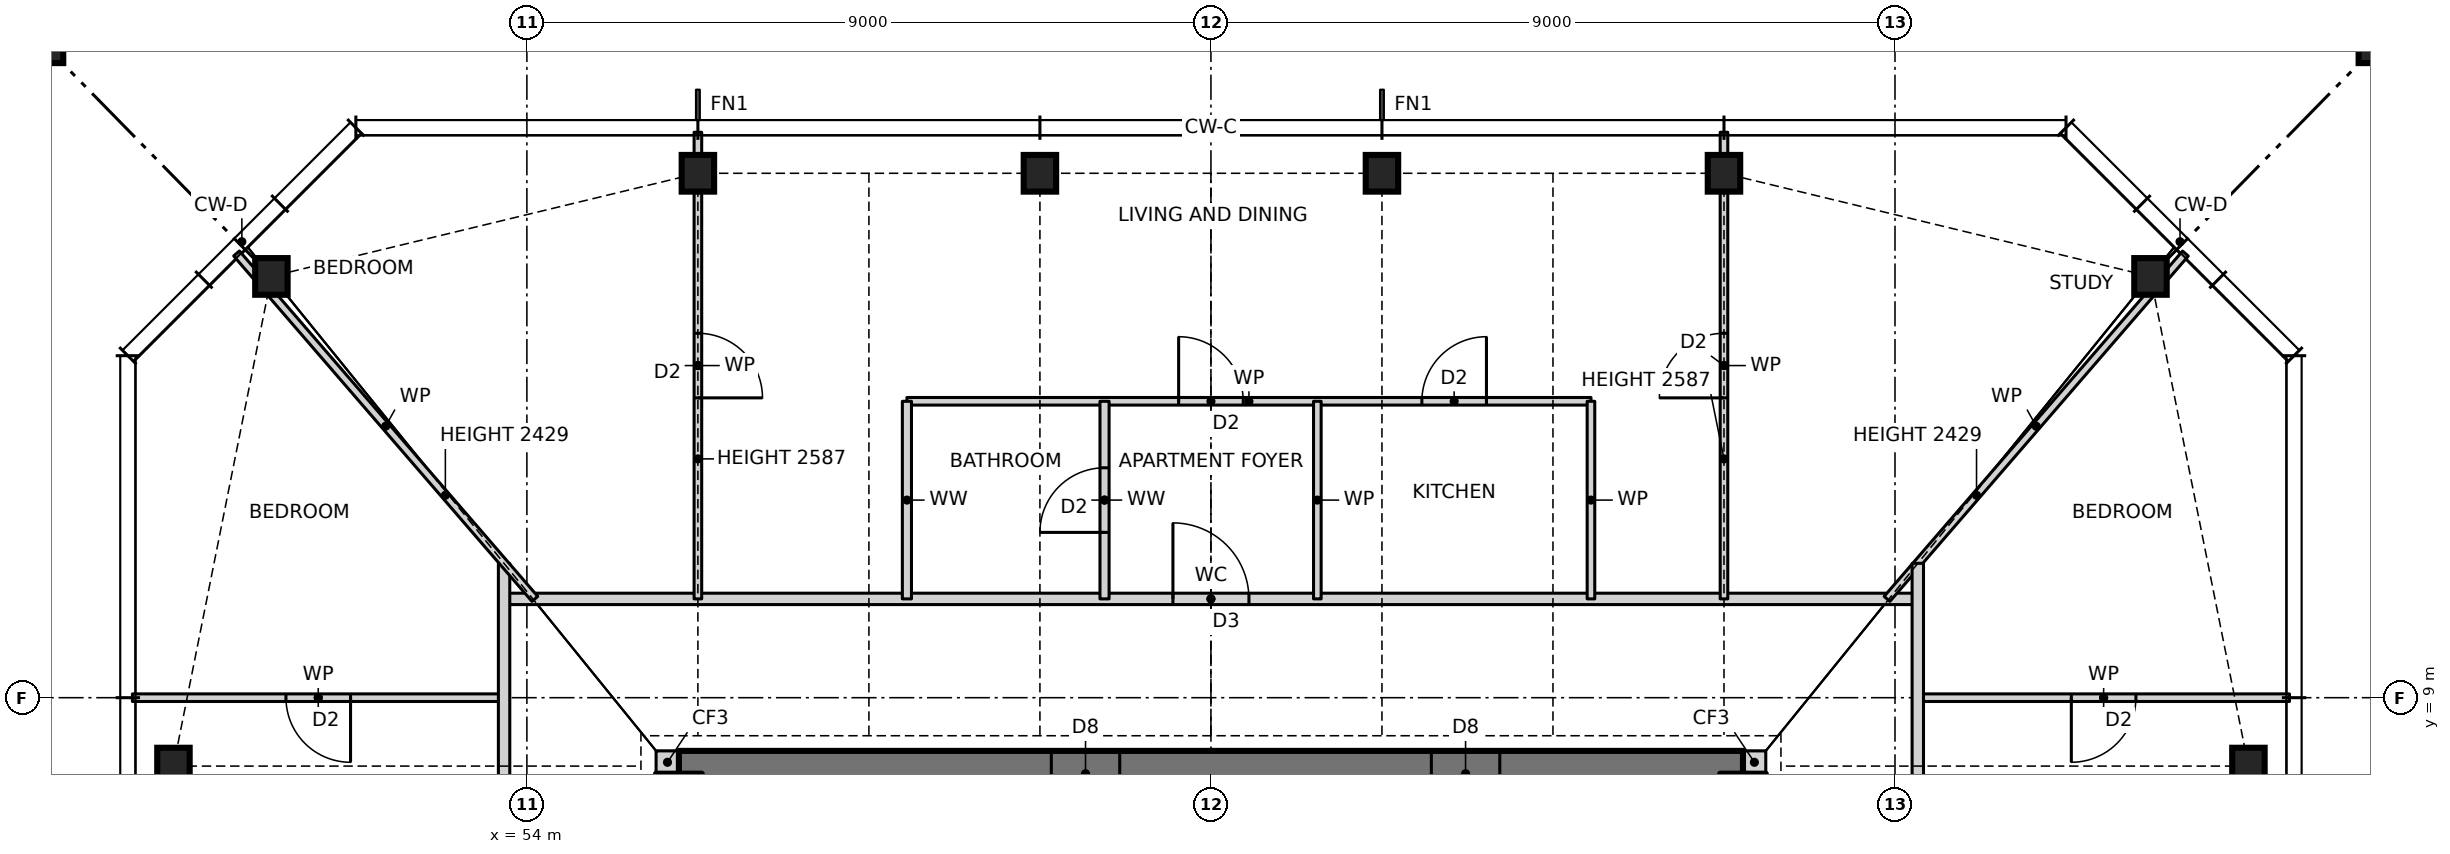
"""IFC4 building model, lengths in metres.
Left out: names, types, materials, properties, quantities, classifications, styles, units other than length and angle.
Written with IfcOpenShell. Run it as: python <this file> out.ifc"""

import sys

from ifc_helpers import new_model, si_unit, direction, frame, frame_2d, origin, origin_2d, place, context, subcontext, project, spatial, rectangle, hollow_rectangle, i_section, extrude, element, fill, save


model = new_model("IFC4")
c1 = context("Model", 3, precision=1e-05, world=origin(), true_north=direction((0.0, 1.0)))
c2 = subcontext(c1, "Body", "Model", "MODEL_VIEW")
j1 = project(units=[si_unit("LENGTHUNIT", "METRE"), si_unit("PLANEANGLEUNIT", "RADIAN")], contexts=[c1])
p1 = place(None, origin())
s1 = spatial("IfcSite", under=j1, at=p1, CompositionType="ELEMENT")
p2 = place(p1, origin())
s2 = spatial("IfcBuilding", under=s1, at=p2, CompositionType="ELEMENT")
p3 = place(p2, frame((0.0, 0.0, 112.0)))
s3 = spatial("IfcBuildingStorey", under=s2, at=p3, CompositionType="ELEMENT", Elevation=112.0)
for number, where, z_axis, x_axis in (
    (1, (76.65, 8.1, 0.0), (0.0, 0.0, 1.0), (1.0, 0.0, 0.0)),
    (2, (75.361, 14.543, 0.0), (0.0, 0.0, 1.0), (1.0, 0.0, 0.0)),
    (3, (69.75, 15.9, 0.0), (0.0, 0.0, 1.0), (1.0, 0.0, 0.0)),
    (4, (65.25, 15.9, 0.0), (0.0, 0.0, 1.0), (1.0, 0.0, 0.0)),
    (5, (60.75, 15.9, 0.0), (0.0, 0.0, 1.0), (1.0, 0.0, 0.0)),
    (6, (56.25, 15.9, 0.0), (0.0, 0.0, 1.0), (1.0, 0.0, 0.0)),
    (7, (50.639, 14.543, 0.0), (0.0, 0.0, 1.0), (1.0, 0.0, 0.0)),
    (8, (49.35, 8.1, 0.0), (0.0, 0.0, 1.0), (1.0, 0.0, 0.0)),
):
    element("IfcColumn", number, at=place(p3, frame(where, z_axis=z_axis, x_axis=x_axis)), inside=s3, PredefinedType="COLUMN", context=c2, shape_type="SweptSolid", body=[
        extrude(i_section(OverallWidth=0.427, OverallDepth=0.483, WebThickness=0.051, FlangeThickness=0.082, at=origin_2d()), origin(), (0.0, 0.0, 1.0), 3.5),
    ])
for number, where, z_axis, x_axis in (
    (9, (78.65, 17.9, 0.0), (0.0, 0.0, 1.0), (1.0, 0.0, 0.0)),
    (10, (47.35, 17.9, 0.0), (0.0, 0.0, 1.0), (1.0, 0.0, 0.0)),
):
    element("IfcColumn", number, at=place(p3, frame(where, z_axis=z_axis, x_axis=x_axis)), inside=s3, PredefinedType="COLUMN", context=c2, shape_type="SweptSolid", body=[
        extrude(hollow_rectangle(XDim=1.1, YDim=1.1, WallThickness=0.06, at=origin_2d()), origin(), (0.0, 0.0, 1.0), 3.5),
    ])
for number, where, z_axis, x_axis in (
    (11, (70.0, 8.15, 0.0), (0.0, 0.0, 1.0), (1.0, 0.0, 0.0)),
    (12, (55.7, 8.15, 0.0), (0.0, 0.0, 1.0), (1.0, 0.0, 0.0)),
):
    element("IfcWall", number, at=place(p3, frame(where, z_axis=z_axis, x_axis=x_axis)), inside=s3, PredefinedType="SOLIDWALL", context=c2, shape_type="SweptSolid", body=[
        extrude(rectangle(XDim=0.3, YDim=0.3, at=frame_2d((0.15, 0.0))), origin(), (0.0, 0.0, 1.0), 3.5),
    ])
p4 = place(p3, frame((70.0, 8.0, 0.0), z_axis=(0.0, 0.0, 1.0), x_axis=(-1.0, 0.0, 0.0)))
e13 = element("IfcWall", 13, at=p4, inside=s3, PredefinedType="SHEAR", context=c2, shape_type="SweptSolid", body=[
    extrude(rectangle(XDim=14.0, YDim=0.6, at=frame_2d((7.0, 0.0))), origin(), (0.0, 0.0, 1.0), 3.5),
])
p5 = place(p4, frame((8.2, 0.0, 0.0)))
e14 = element("IfcOpeningElement", 14, at=p5, cuts=e13, PredefinedType="OPENING", context=c2, shape_type="SweptSolid", body=[
    extrude(rectangle(XDim=0.9, YDim=2.1, at=frame_2d((0.45, 1.05))), frame((0.0, 0.31, 0.0), z_axis=(0.0, -1.0, 0.0), x_axis=(1.0, 0.0, 0.0)), (0.0, 0.0, 1.0), 0.62),
])
p6 = place(p4, frame((3.2, 0.0, 0.0)))
e15 = element("IfcOpeningElement", 15, at=p6, cuts=e13, PredefinedType="OPENING", context=c2, shape_type="SweptSolid", body=[
    extrude(rectangle(XDim=0.9, YDim=2.1, at=frame_2d((0.45, 1.05))), frame((0.0, 0.31, 0.0), z_axis=(0.0, -1.0, 0.0), x_axis=(1.0, 0.0, 0.0)), (0.0, 0.0, 1.0), 0.62),
])
p7 = place(p3, frame((48.81, 9.0, 0.0), z_axis=(0.0, 0.0, 1.0), x_axis=(1.0, 0.0, 0.0)))
e16 = element("IfcWall", 16, at=p7, inside=s3, PredefinedType="PARTITIONING", context=c2, shape_type="SweptSolid", body=[
    extrude(rectangle(XDim=4.89, YDim=0.1, at=frame_2d((2.445, 0.0))), origin(), (0.0, 0.0, 1.0), 3.27),
])
p8 = place(p7, frame((2.02, 0.0, 0.0)))
e17 = element("IfcOpeningElement", 17, at=p8, cuts=e16, PredefinedType="OPENING", context=c2, shape_type="SweptSolid", body=[
    extrude(rectangle(XDim=0.85, YDim=2.1, at=frame_2d((0.425, 1.05))), frame((0.0, 0.06, 0.0), z_axis=(0.0, -1.0, 0.0), x_axis=(1.0, 0.0, 0.0)), (0.0, 0.0, 1.0), 0.12),
])
p9 = place(p3, frame((72.3, 9.0, 0.0), z_axis=(0.0, 0.0, 1.0), x_axis=(1.0, 0.0, 0.0)))
e18 = element("IfcWall", 18, at=p9, inside=s3, PredefinedType="PARTITIONING", context=c2, shape_type="SweptSolid", body=[
    extrude(rectangle(XDim=4.89, YDim=0.1, at=frame_2d((2.445, 0.0))), origin(), (0.0, 0.0, 1.0), 3.27),
])
p10 = place(p9, frame((2.02, 0.0, 0.0)))
e19 = element("IfcOpeningElement", 19, at=p10, cuts=e18, PredefinedType="OPENING", context=c2, shape_type="SweptSolid", body=[
    extrude(rectangle(XDim=0.85, YDim=2.1, at=frame_2d((0.425, 1.05))), frame((0.0, 0.06, 0.0), z_axis=(0.0, -1.0, 0.0), x_axis=(1.0, 0.0, 0.0)), (0.0, 0.0, 1.0), 0.12),
])
p11 = place(p3, frame((53.7, 10.3, 0.0), z_axis=(0.0, 0.0, 1.0), x_axis=(1.0, 0.0, 0.0)))
e20 = element("IfcWall", 20, at=p11, inside=s3, PredefinedType="PARTITIONING", context=c2, shape_type="SweptSolid", body=[
    extrude(rectangle(XDim=18.6, YDim=0.15, at=frame_2d((9.3, 0.0))), origin(), (0.0, 0.0, 1.0), 3.27),
])
p12 = place(p11, frame((8.8, 0.0, 0.0)))
e21 = element("IfcOpeningElement", 21, at=p12, cuts=e20, PredefinedType="OPENING", context=c2, shape_type="SweptSolid", body=[
    extrude(rectangle(XDim=1.0, YDim=2.1, at=frame_2d((0.5, 1.05))), frame((0.0, 0.085, 0.0), z_axis=(0.0, -1.0, 0.0), x_axis=(1.0, 0.0, 0.0)), (0.0, 0.0, 1.0), 0.17),
])
p13 = place(p3, frame((59.0, 12.9, 0.0), z_axis=(0.0, 0.0, 1.0), x_axis=(1.0, 0.0, 0.0)))
e22 = element("IfcWall", 22, at=p13, inside=s3, PredefinedType="PARTITIONING", context=c2, shape_type="SweptSolid", body=[
    extrude(rectangle(XDim=9.0, YDim=0.1, at=frame_2d((4.5, 0.0))), origin(), (0.0, 0.0, 1.0), 3.27),
])
p14 = place(p13, frame((6.775, 0.0, 0.0)))
e23 = element("IfcOpeningElement", 23, at=p14, cuts=e22, PredefinedType="OPENING", context=c2, shape_type="SweptSolid", body=[
    extrude(rectangle(XDim=0.85, YDim=2.1, at=frame_2d((0.425, 1.05))), frame((0.0, 0.06, 0.0), z_axis=(0.0, -1.0, 0.0), x_axis=(1.0, 0.0, 0.0)), (0.0, 0.0, 1.0), 0.12),
])
p15 = place(p13, frame((3.575, 0.0, 0.0)))
e24 = element("IfcOpeningElement", 24, at=p15, cuts=e22, PredefinedType="OPENING", context=c2, shape_type="SweptSolid", body=[
    extrude(rectangle(XDim=0.85, YDim=2.1, at=frame_2d((0.425, 1.05))), frame((0.0, 0.06, 0.0), z_axis=(0.0, -1.0, 0.0), x_axis=(1.0, 0.0, 0.0)), (0.0, 0.0, 1.0), 0.12),
])
p16 = place(p3, frame((71.895, 10.3, 0.0), z_axis=(0.0, 0.0, 1.0), x_axis=(0.65378286253, 0.756682211144, 0.0)))
e25 = element("IfcWall", 25, at=p16, inside=s3, PredefinedType="PARTITIONING", context=c2, shape_type="SweptSolid", body=[
    extrude(rectangle(XDim=6.005, YDim=0.1, at=frame_2d((3.002, 0.0))), origin(), (0.0, 0.0, 1.0), 2.429),
])
p17 = place(p3, frame((72.3, -10.768, 0.0), z_axis=(0.0, 0.0, 1.0), x_axis=(0.0, 1.0, 0.0)))
e26 = element("IfcWall", 26, at=p17, inside=s3, PredefinedType="PARTITIONING", context=c2, shape_type="SweptSolid", body=[
    extrude(rectangle(XDim=21.536, YDim=0.15, at=frame_2d((10.768, 0.0))), origin(), (0.0, 0.0, 1.0), 3.27),
])
p18 = place(p17, frame((10.268, 0.0, 0.0)))
e27 = element("IfcOpeningElement", 27, at=p18, cuts=e26, PredefinedType="OPENING", context=c2, shape_type="SweptSolid", body=[
    extrude(rectangle(XDim=1.0, YDim=2.1, at=frame_2d((0.5, 1.05))), frame((0.0, 0.085, 0.0), z_axis=(0.0, -1.0, 0.0), x_axis=(1.0, 0.0, 0.0)), (0.0, 0.0, 1.0), 0.17),
])
p19 = place(p3, frame((69.75, 10.3, 0.0), z_axis=(0.0, 0.0, 1.0), x_axis=(0.0, 1.0, 0.0)))
e28 = element("IfcWall", 28, at=p19, inside=s3, PredefinedType="PARTITIONING", context=c2, shape_type="SweptSolid", body=[
    extrude(rectangle(XDim=6.14, YDim=0.1, at=frame_2d((3.07, 0.0))), origin(), (0.0, 0.0, 1.0), 2.587),
])
p20 = place(p19, frame((2.645, 0.0, 0.0)))
e29 = element("IfcOpeningElement", 29, at=p20, cuts=e28, PredefinedType="OPENING", context=c2, shape_type="SweptSolid", body=[
    extrude(rectangle(XDim=0.85, YDim=2.1, at=frame_2d((0.425, 1.05))), frame((0.0, 0.06, 0.0), z_axis=(0.0, -1.0, 0.0), x_axis=(1.0, 0.0, 0.0)), (0.0, 0.0, 1.0), 0.12),
])
for number, where, z_axis, x_axis in (
    (30, (68.0, 10.3, 0.0), (0.0, 0.0, 1.0), (0.0, 1.0, 0.0)),
    (31, (64.4, 10.3, 0.0), (0.0, 0.0, 1.0), (0.0, 1.0, 0.0)),
):
    element("IfcWall", number, at=place(p3, frame(where, z_axis=z_axis, x_axis=x_axis)), inside=s3, PredefinedType="PARTITIONING", context=c2, shape_type="SweptSolid", body=[
        extrude(rectangle(XDim=2.6, YDim=0.1, at=frame_2d((1.3, 0.0))), origin(), (0.0, 0.0, 1.0), 3.27),
    ])
p21 = place(p3, frame((61.6, 10.3, 0.0), z_axis=(0.0, 0.0, 1.0), x_axis=(0.0, 1.0, 0.0)))
e32 = element("IfcWall", 32, at=p21, inside=s3, PredefinedType="PARTITIONING", context=c2, shape_type="SweptSolid", body=[
    extrude(rectangle(XDim=2.6, YDim=0.12, at=frame_2d((1.3, 0.0))), origin(), (0.0, 0.0, 1.0), 3.27),
])
p22 = place(p21, frame((0.875, 0.0, 0.0)))
e33 = element("IfcOpeningElement", 33, at=p22, cuts=e32, PredefinedType="OPENING", context=c2, shape_type="SweptSolid", body=[
    extrude(rectangle(XDim=0.85, YDim=2.1, at=frame_2d((0.425, 1.05))), frame((0.0, 0.07, 0.0), z_axis=(0.0, -1.0, 0.0), x_axis=(1.0, 0.0, 0.0)), (0.0, 0.0, 1.0), 0.14),
])
p23 = place(p3, frame((59.0, 10.3, 0.0), z_axis=(0.0, 0.0, 1.0), x_axis=(0.0, 1.0, 0.0)))
e34 = element("IfcWall", 34, at=p23, inside=s3, PredefinedType="PARTITIONING", context=c2, shape_type="SweptSolid", body=[
    extrude(rectangle(XDim=2.6, YDim=0.12, at=frame_2d((1.3, 0.0))), origin(), (0.0, 0.0, 1.0), 3.27),
])
p24 = place(p3, frame((56.25, 10.3, 0.0), z_axis=(0.0, 0.0, 1.0), x_axis=(0.0, 1.0, 0.0)))
e35 = element("IfcWall", 35, at=p24, inside=s3, PredefinedType="PARTITIONING", context=c2, shape_type="SweptSolid", body=[
    extrude(rectangle(XDim=6.14, YDim=0.1, at=frame_2d((3.07, 0.0))), origin(), (0.0, 0.0, 1.0), 2.587),
])
p25 = place(p24, frame((2.645, 0.0, 0.0)))
e36 = element("IfcOpeningElement", 36, at=p25, cuts=e35, PredefinedType="OPENING", context=c2, shape_type="SweptSolid", body=[
    extrude(rectangle(XDim=0.85, YDim=2.1, at=frame_2d((0.425, 1.05))), frame((0.0, 0.06, 0.0), z_axis=(0.0, -1.0, 0.0), x_axis=(1.0, 0.0, 0.0)), (0.0, 0.0, 1.0), 0.12),
])
p26 = place(p3, frame((53.7, -10.768, 0.0), z_axis=(0.0, 0.0, 1.0), x_axis=(0.0, 1.0, 0.0)))
e37 = element("IfcWall", 37, at=p26, inside=s3, PredefinedType="PARTITIONING", context=c2, shape_type="SweptSolid", body=[
    extrude(rectangle(XDim=21.536, YDim=0.15, at=frame_2d((10.768, 0.0))), origin(), (0.0, 0.0, 1.0), 3.27),
])
p27 = place(p26, frame((10.268, 0.0, 0.0)))
e38 = element("IfcOpeningElement", 38, at=p27, cuts=e37, PredefinedType="OPENING", context=c2, shape_type="SweptSolid", body=[
    extrude(rectangle(XDim=1.0, YDim=2.1, at=frame_2d((0.5, 1.05))), frame((0.0, 0.085, 0.0), z_axis=(0.0, -1.0, 0.0), x_axis=(1.0, 0.0, 0.0)), (0.0, 0.0, 1.0), 0.17),
])
p28 = place(p3, frame((54.105, 10.3, 0.0), z_axis=(0.0, 0.0, 1.0), x_axis=(-0.653606109319, 0.756834892074, 0.0)))
e39 = element("IfcWall", 39, at=p28, inside=s3, PredefinedType="PARTITIONING", context=c2, shape_type="SweptSolid", body=[
    extrude(rectangle(XDim=6.005, YDim=0.1, at=frame_2d((3.002, 0.0))), origin(), (0.0, 0.0, 1.0), 2.429),
])
p29 = place(p10, frame((0.85, 0.0, 0.0), z_axis=(0.0, 0.0, 1.0), x_axis=(-1.0, 0.0, 0.0)))
e40 = element("IfcDoor", 40, at=p29, inside=s3, OperationType="SINGLE_SWING_RIGHT", PredefinedType="DOOR", context=c2, shape_type="SweptSolid", body=[
    extrude(rectangle(XDim=0.85, YDim=2.1, at=frame_2d((0.425, 1.05))), frame((0.0, 0.025, 0.0), z_axis=(0.0, -1.0, 0.0), x_axis=(1.0, 0.0, 0.0)), (0.0, 0.0, 1.0), 0.05),
])
fill(e19, e40)
p30 = place(p14, origin())
e41 = element("IfcDoor", 41, at=p30, inside=s3, OperationType="SINGLE_SWING_RIGHT", PredefinedType="DOOR", context=c2, shape_type="SweptSolid", body=[
    extrude(rectangle(XDim=0.85, YDim=2.1, at=frame_2d((0.425, 1.05))), frame((0.0, 0.025, 0.0), z_axis=(0.0, -1.0, 0.0), x_axis=(1.0, 0.0, 0.0)), (0.0, 0.0, 1.0), 0.05),
])
fill(e23, e41)
p31 = place(p12, origin())
e42 = element("IfcDoor", 42, at=p31, inside=s3, OperationType="SINGLE_SWING_LEFT", PredefinedType="DOOR", context=c2, shape_type="SweptSolid", body=[
    extrude(rectangle(XDim=1.0, YDim=2.1, at=frame_2d((0.5, 1.05))), frame((0.0, 0.025, 0.0), z_axis=(0.0, -1.0, 0.0), x_axis=(1.0, 0.0, 0.0)), (0.0, 0.0, 1.0), 0.05),
])
fill(e21, e42)
p32 = place(p15, origin())
e43 = element("IfcDoor", 43, at=p32, inside=s3, OperationType="SINGLE_SWING_LEFT", PredefinedType="DOOR", context=c2, shape_type="SweptSolid", body=[
    extrude(rectangle(XDim=0.85, YDim=2.1, at=frame_2d((0.425, 1.05))), frame((0.0, 0.025, 0.0), z_axis=(0.0, -1.0, 0.0), x_axis=(1.0, 0.0, 0.0)), (0.0, 0.0, 1.0), 0.05),
])
fill(e24, e43)
p33 = place(p22, origin())
e44 = element("IfcDoor", 44, at=p33, inside=s3, OperationType="SINGLE_SWING_LEFT", PredefinedType="DOOR", context=c2, shape_type="SweptSolid", body=[
    extrude(rectangle(XDim=0.85, YDim=2.1, at=frame_2d((0.425, 1.05))), frame((0.0, 0.025, 0.0), z_axis=(0.0, -1.0, 0.0), x_axis=(1.0, 0.0, 0.0)), (0.0, 0.0, 1.0), 0.05),
])
fill(e33, e44)
p34 = place(p20, origin())
e45 = element("IfcDoor", 45, at=p34, inside=s3, OperationType="SINGLE_SWING_LEFT", PredefinedType="DOOR", context=c2, shape_type="SweptSolid", body=[
    extrude(rectangle(XDim=0.85, YDim=2.1, at=frame_2d((0.425, 1.05))), frame((0.0, 0.025, 0.0), z_axis=(0.0, -1.0, 0.0), x_axis=(1.0, 0.0, 0.0)), (0.0, 0.0, 1.0), 0.05),
])
fill(e29, e45)
p35 = place(p25, frame((0.85, 0.0, 0.0), z_axis=(0.0, 0.0, 1.0), x_axis=(-1.0, 0.0, 0.0)))
e46 = element("IfcDoor", 46, at=p35, inside=s3, OperationType="SINGLE_SWING_RIGHT", PredefinedType="DOOR", context=c2, shape_type="SweptSolid", body=[
    extrude(rectangle(XDim=0.85, YDim=2.1, at=frame_2d((0.425, 1.05))), frame((0.0, 0.025, 0.0), z_axis=(0.0, -1.0, 0.0), x_axis=(1.0, 0.0, 0.0)), (0.0, 0.0, 1.0), 0.05),
])
fill(e36, e46)
p36 = place(p8, frame((0.85, 0.0, 0.0), z_axis=(0.0, 0.0, 1.0), x_axis=(-1.0, 0.0, 0.0)))
e47 = element("IfcDoor", 47, at=p36, inside=s3, OperationType="SINGLE_SWING_LEFT", PredefinedType="DOOR", context=c2, shape_type="SweptSolid", body=[
    extrude(rectangle(XDim=0.85, YDim=2.1, at=frame_2d((0.425, 1.05))), frame((0.0, 0.025, 0.0), z_axis=(0.0, -1.0, 0.0), x_axis=(1.0, 0.0, 0.0)), (0.0, 0.0, 1.0), 0.05),
])
fill(e17, e47)
p37 = place(p5, origin())
e48 = element("IfcDoor", 48, at=p37, inside=s3, OperationType="SINGLE_SWING_RIGHT", PredefinedType="DOOR", context=c2, shape_type="SweptSolid", body=[
    extrude(rectangle(XDim=0.9, YDim=2.1, at=frame_2d((0.45, 1.05))), frame((0.0, 0.025, 0.0), z_axis=(0.0, -1.0, 0.0), x_axis=(1.0, 0.0, 0.0)), (0.0, 0.0, 1.0), 0.05),
])
fill(e14, e48)
p38 = place(p6, origin())
e49 = element("IfcDoor", 49, at=p38, inside=s3, OperationType="SINGLE_SWING_RIGHT", PredefinedType="DOOR", context=c2, shape_type="SweptSolid", body=[
    extrude(rectangle(XDim=0.9, YDim=2.1, at=frame_2d((0.45, 1.05))), frame((0.0, 0.025, 0.0), z_axis=(0.0, -1.0, 0.0), x_axis=(1.0, 0.0, 0.0)), (0.0, 0.0, 1.0), 0.05),
])
fill(e15, e49)
save(model, sys.argv[1])
